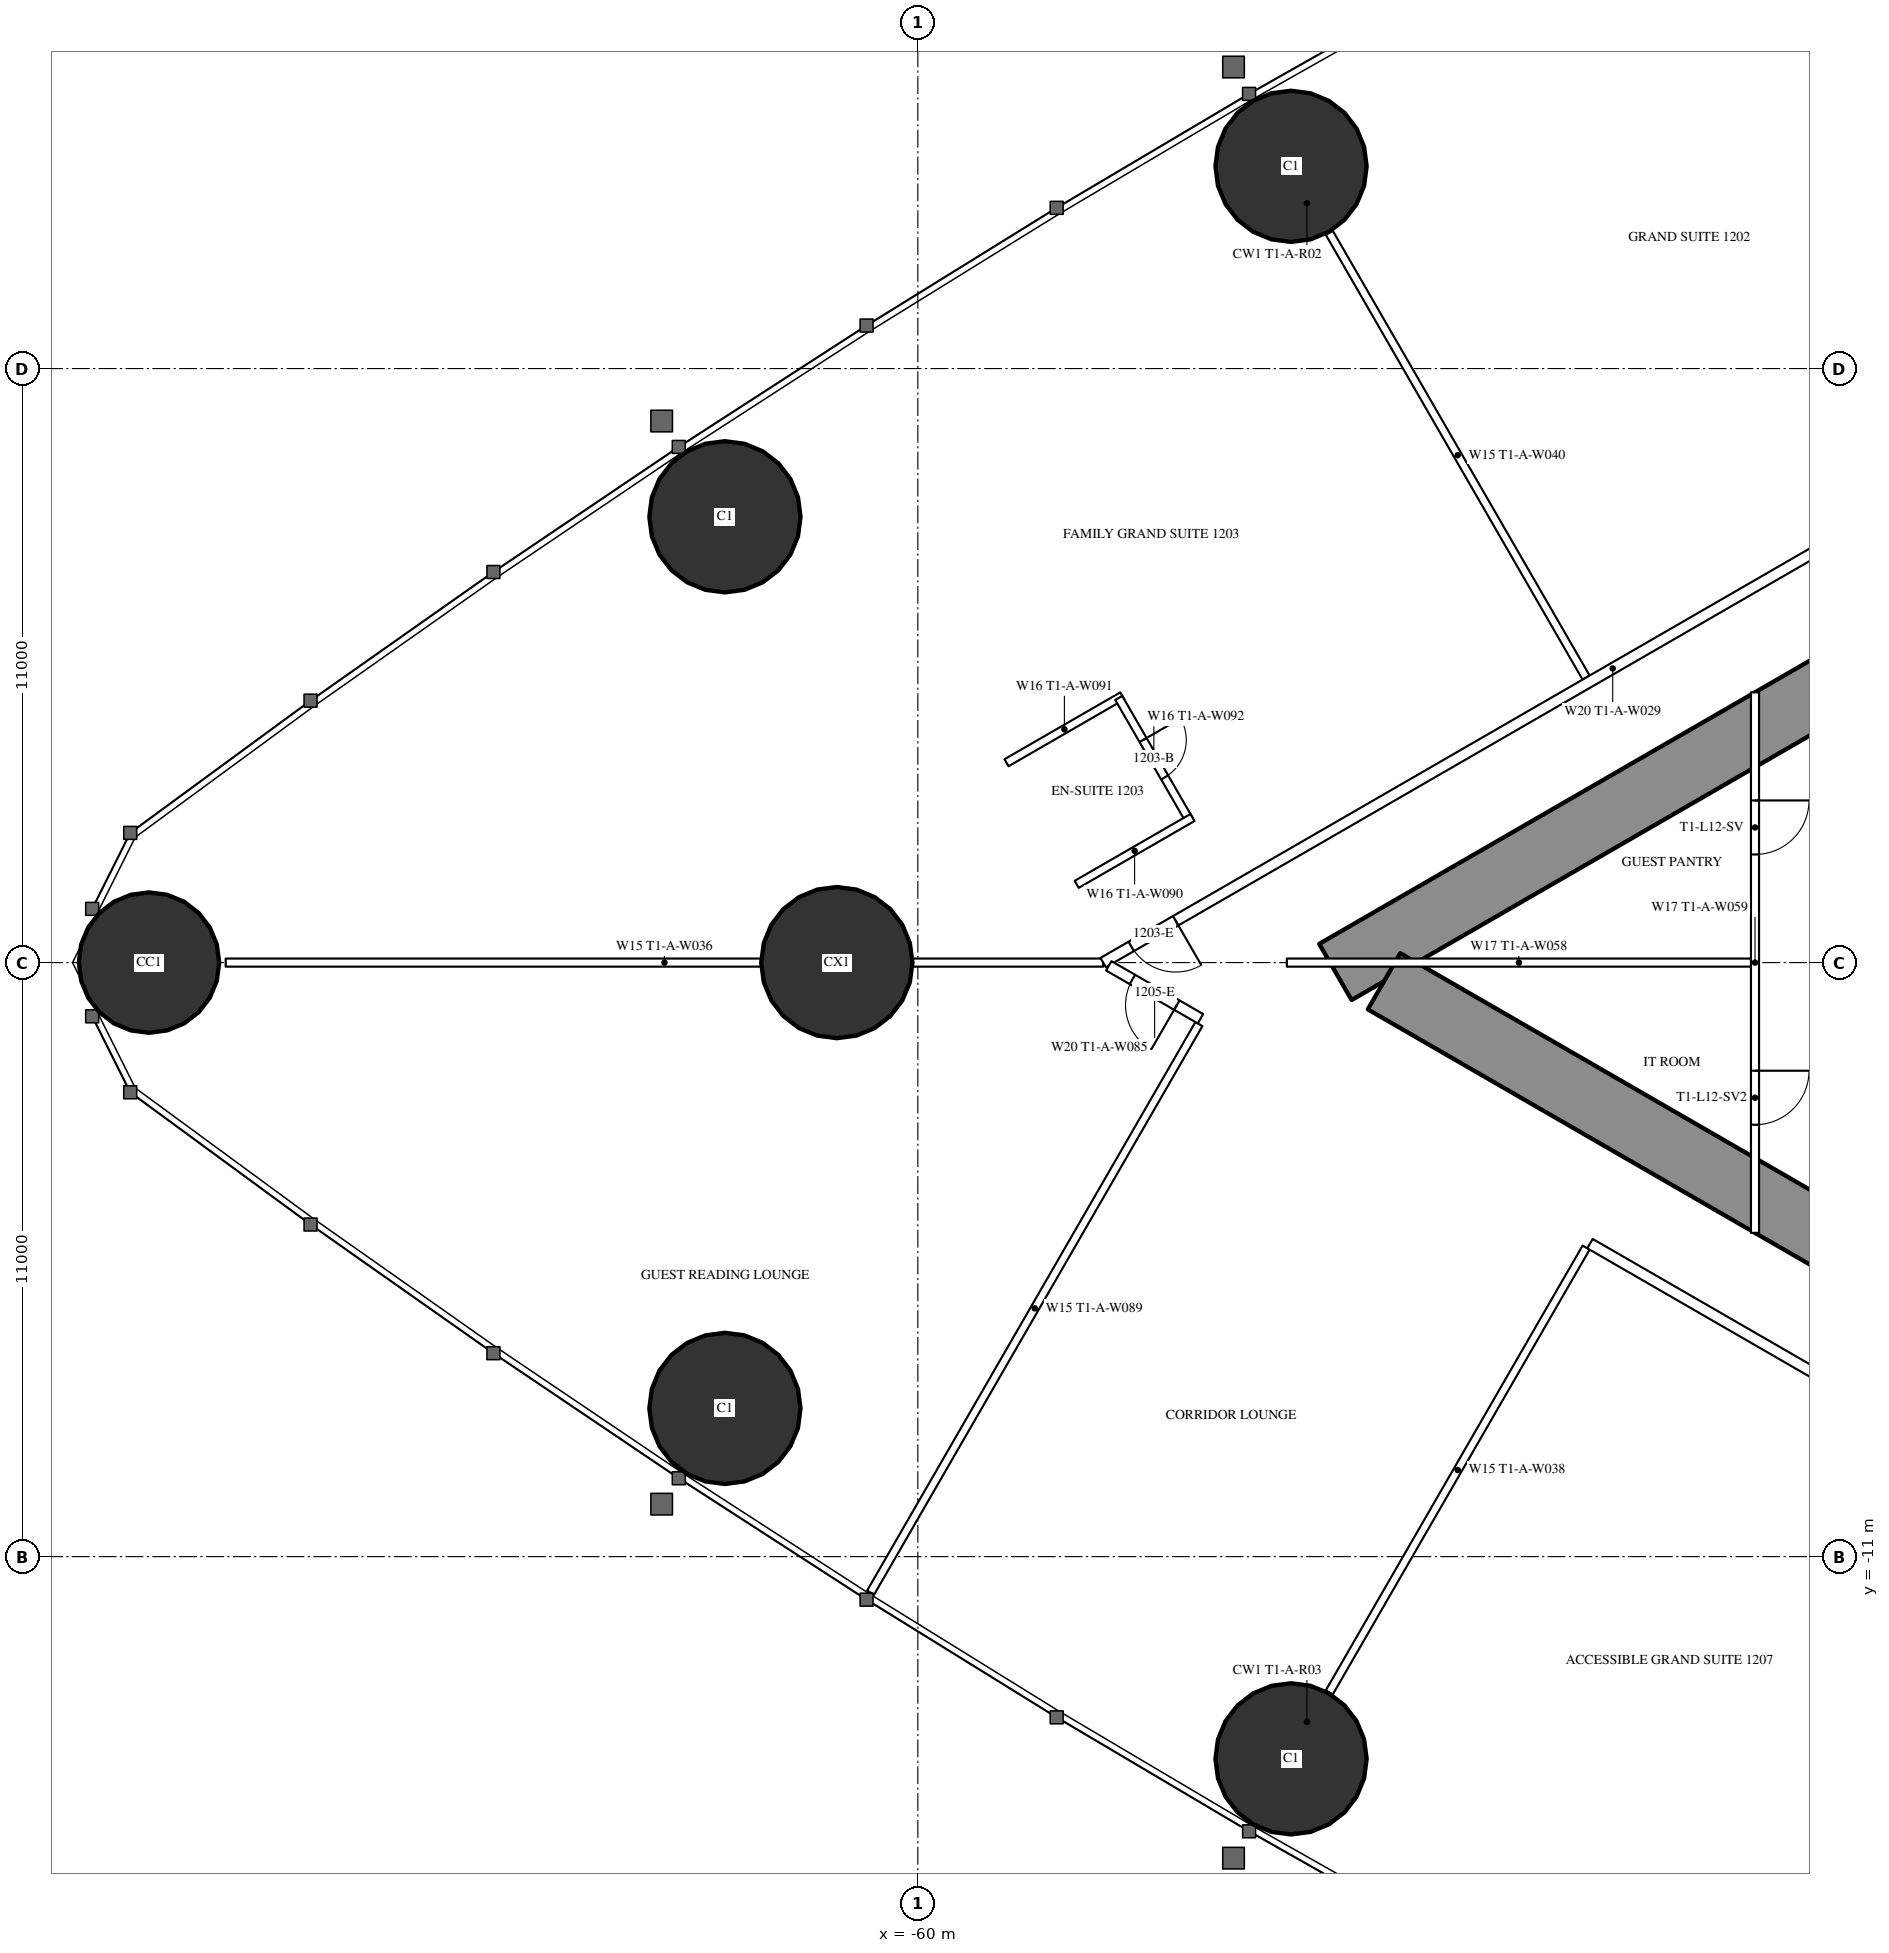
"""IFC4 building model, lengths in metres.
Left out: names, types, materials, properties, quantities, classifications, styles, units other than length and angle.
Written with IfcOpenShell. Run it as: python <this file> out.ifc"""

import sys

from ifc_helpers import new_model, si_unit, direction, frame, frame_2d, origin, origin_2d, place, context, subcontext, project, spatial, rectangle, hollow_circle, extrude, element, fill, save


model = new_model("IFC4")
c1 = context("Model", 3, precision=1e-05, world=origin(), true_north=direction((0.0, 1.0)))
c2 = subcontext(c1, "Body", "Model", "MODEL_VIEW")
j1 = project(units=[si_unit("LENGTHUNIT", "METRE"), si_unit("PLANEANGLEUNIT", "RADIAN")], contexts=[c1])
p1 = place(None, origin())
s1 = spatial("IfcSite", under=j1, at=p1, CompositionType="ELEMENT")
p2 = place(p1, origin())
s2 = spatial("IfcBuilding", under=s1, at=p2, CompositionType="ELEMENT")
p3 = place(p2, frame((0.0, 0.0, 49.5)))
s3 = spatial("IfcBuildingStorey", under=s2, at=p3, CompositionType="ELEMENT", Elevation=49.5)
p4 = place(p3, frame((-74.235, 0.0, 0.0), z_axis=(0.0, 0.0, 1.0), x_axis=(1.0, 0.0, 0.0)))
e1 = element("IfcColumn", 1, at=p4, inside=s3, PredefinedType="COLUMN", context=c2, shape_type="SweptSolid", body=[
    extrude(hollow_circle(Radius=1.3, WallThickness=0.1, at=origin_2d()), origin(), (0.0, 0.0, 1.0), 3.5),
])
for number, where, z_axis, x_axis in (
    (2, (-63.572, -8.255, 0.0), (0.0, 0.0, 1.0), (1.0, 0.0, 0.0)),
    (3, (-53.09, -14.745, 0.0), (0.0, 0.0, 1.0), (1.0, 0.0, 0.0)),
    (4, (-53.09, 14.745, 0.0), (0.0, 0.0, 1.0), (1.0, 0.0, 0.0)),
    (5, (-63.572, 8.255, 0.0), (0.0, 0.0, 1.0), (1.0, 0.0, 0.0)),
):
    element("IfcColumn", number, at=place(p3, frame(where, z_axis=z_axis, x_axis=x_axis)), inside=s3, PredefinedType="COLUMN", context=c2, shape_type="SweptSolid", body=[
        extrude(hollow_circle(Radius=1.4, WallThickness=0.12, at=origin_2d()), origin(), (0.0, 0.0, 1.0), 3.5),
    ])
p5 = place(p3, frame((-61.5, 0.0, 0.0), z_axis=(0.0, 0.0, 1.0), x_axis=(1.0, 0.0, 0.0)))
e6 = element("IfcColumn", 6, at=p5, inside=s3, PredefinedType="COLUMN", context=c2, shape_type="SweptSolid", body=[
    extrude(hollow_circle(Radius=1.4, WallThickness=0.1, at=origin_2d()), origin(), (0.0, 0.0, 1.0), 3.5),
])
p6 = place(p3, frame((-27.2, 14.3, 0.0), z_axis=(0.0, 0.0, 1.0), x_axis=(-0.866026593062, -0.499997940104, 0.0)))
e7 = element("IfcWall", 7, at=p6, inside=s3, PredefinedType="SHEAR", context=c2, shape_type="SweptSolid", body=[
    extrude(rectangle(XDim=28.946, YDim=1.2, at=frame_2d((14.473, 0.0))), origin(), (0.0, 0.0, 1.0), 3.5),
])
p7 = place(p6, frame((4.6, 0.0, 0.0)))
e8 = element("IfcOpeningElement", 8, at=p7, cuts=e7, PredefinedType="OPENING", context=c2, shape_type="SweptSolid", body=[
    extrude(rectangle(XDim=1.0, YDim=2.2, at=frame_2d((0.5, 1.1))), frame((0.0, 0.61, 0.0), z_axis=(0.0, -1.0, 0.0), x_axis=(1.0, 0.0, 0.0)), (0.0, 0.0, 1.0), 1.22),
])
p8 = place(p6, frame((13.395, 0.0, 0.0)))
e9 = element("IfcOpeningElement", 9, at=p8, cuts=e7, PredefinedType="OPENING", context=c2, shape_type="SweptSolid", body=[
    extrude(rectangle(XDim=1.8, YDim=2.2, at=frame_2d((0.9, 1.1))), frame((0.0, 0.61, 0.0), z_axis=(0.0, -1.0, 0.0), x_axis=(1.0, 0.0, 0.0)), (0.0, 0.0, 1.0), 1.22),
])
p9 = place(p3, frame((-27.2, -14.3, 0.0), z_axis=(0.0, 0.0, 1.0), x_axis=(-0.866024021859, 0.500002393557, 0.0)))
e10 = element("IfcWall", 10, at=p9, inside=s3, PredefinedType="SHEAR", context=c2, shape_type="SweptSolid", body=[
    extrude(rectangle(XDim=27.907, YDim=1.2, at=frame_2d((13.954, 0.0))), origin(), (0.0, 0.0, 1.0), 3.5),
])
p10 = place(p9, frame((4.6, 0.0, 0.0)))
e11 = element("IfcOpeningElement", 11, at=p10, cuts=e10, PredefinedType="OPENING", context=c2, shape_type="SweptSolid", body=[
    extrude(rectangle(XDim=1.0, YDim=2.2, at=frame_2d((0.5, 1.1))), frame((0.0, 0.61, 0.0), z_axis=(0.0, -1.0, 0.0), x_axis=(1.0, 0.0, 0.0)), (0.0, 0.0, 1.0), 1.22),
])
p11 = place(p9, frame((13.395, 0.0, 0.0)))
e12 = element("IfcOpeningElement", 12, at=p11, cuts=e10, PredefinedType="OPENING", context=c2, shape_type="SweptSolid", body=[
    extrude(rectangle(XDim=1.8, YDim=2.2, at=frame_2d((0.9, 1.1))), frame((0.0, 0.61, 0.0), z_axis=(0.0, -1.0, 0.0), x_axis=(1.0, 0.0, 0.0)), (0.0, 0.0, 1.0), 1.22),
])
for number, where, z_axis, x_axis in (
    (13, (-47.627, 5.278, 0.0), (0.0, 0.0, 1.0), (-0.5, 0.866, 0.0)),
    (14, (-47.627, -5.278, 0.0), (0.0, 0.0, 1.0), (-0.5, -0.866, 0.0)),
):
    element("IfcWall", number, at=place(p3, frame(where, z_axis=z_axis, x_axis=x_axis)), inside=s3, PredefinedType="PARTITIONING", context=c2, shape_type="SweptSolid", body=[
        extrude(rectangle(XDim=9.51, YDim=0.15, at=frame_2d((4.755, 0.0))), origin(), (0.0, 0.0, 1.0), 2.25),
    ])
p12 = place(p3, frame((-54.796, -1.139, 0.0), z_axis=(0.0, 0.0, 1.0), x_axis=(-0.499998860433, -0.866026061713, 0.0)))
e15 = element("IfcWall", 15, at=p12, inside=s3, PredefinedType="PARTITIONING", context=c2, shape_type="SweptSolid", body=[
    extrude(rectangle(XDim=12.157, YDim=0.15, at=frame_2d((6.078, 0.0))), origin(), (0.0, 0.0, 1.0), 3.25),
])
p13 = place(p3, frame((-56.568, 0.0, 0.0), z_axis=(0.0, 0.0, 1.0), x_axis=(-1.0, 0.0, 0.0)))
e16 = element("IfcWall", 16, at=p13, inside=s3, PredefinedType="PARTITIONING", context=c2, shape_type="SweptSolid", body=[
    extrude(rectangle(XDim=16.247, YDim=0.15, at=frame_2d((8.124, 0.0))), origin(), (0.0, 0.0, 1.0), 2.25),
])
p14 = place(p3, frame((-37.7, 10.894, 0.0), z_axis=(0.0, 0.0, 1.0), x_axis=(-0.866027905338, -0.499995667157, 0.0)))
e17 = element("IfcWall", 17, at=p14, inside=s3, PredefinedType="PARTITIONING", context=c2, shape_type="SweptSolid", body=[
    extrude(rectangle(XDim=21.787, YDim=0.2, at=frame_2d((10.894, 0.0))), origin(), (0.0, 0.0, 1.0), 3.25),
])
p15 = place(p14, frame((20.237, 0.0, 0.0)))
e18 = element("IfcOpeningElement", 18, at=p15, cuts=e17, PredefinedType="OPENING", context=c2, shape_type="SweptSolid", body=[
    extrude(rectangle(XDim=0.95, YDim=2.2, at=frame_2d((0.475, 1.1))), frame((0.0, 0.11, 0.0), z_axis=(0.0, -1.0, 0.0), x_axis=(1.0, 0.0, 0.0)), (0.0, 0.0, 1.0), 0.22),
])
p16 = place(p14, frame((2.95, 0.0, 0.0)))
e19 = element("IfcOpeningElement", 19, at=p16, cuts=e17, PredefinedType="OPENING", context=c2, shape_type="SweptSolid", body=[
    extrude(rectangle(XDim=0.95, YDim=2.2, at=frame_2d((0.475, 1.1))), frame((0.0, 0.11, 0.0), z_axis=(0.0, -1.0, 0.0), x_axis=(1.0, 0.0, 0.0)), (0.0, 0.0, 1.0), 0.22),
])
p17 = place(p3, frame((-36.92, -11.344, 0.0), z_axis=(0.0, 0.0, 1.0), x_axis=(-0.866025017052, 0.500000669839, 0.0)))
e20 = element("IfcWall", 20, at=p17, inside=s3, PredefinedType="PARTITIONING", context=c2, shape_type="SweptSolid", body=[
    extrude(rectangle(XDim=12.28, YDim=0.2, at=frame_2d((6.14, 0.0))), origin(), (0.0, 0.0, 1.0), 3.25),
])
p18 = place(p17, frame((3.35, 0.0, 0.0)))
e21 = element("IfcOpeningElement", 21, at=p18, cuts=e20, PredefinedType="OPENING", context=c2, shape_type="SweptSolid", body=[
    extrude(rectangle(XDim=1.0, YDim=2.2, at=frame_2d((0.5, 1.1))), frame((0.0, 0.11, 0.0), z_axis=(0.0, -1.0, 0.0), x_axis=(1.0, 0.0, 0.0)), (0.0, 0.0, 1.0), 0.22),
])
p19 = place(p3, frame((-54.768, -1.04, 0.0), z_axis=(0.0, 0.0, 1.0), x_axis=(-0.866056934013, 0.499945384066, 0.0)))
e22 = element("IfcWall", 22, at=p19, inside=s3, PredefinedType="PARTITIONING", context=c2, shape_type="SweptSolid", body=[
    extrude(rectangle(XDim=1.959, YDim=0.2, at=frame_2d((0.979, 0.0))), origin(), (0.0, 0.0, 1.0), 3.25),
])
p20 = place(p19, frame((0.505, 0.0, 0.0)))
e23 = element("IfcOpeningElement", 23, at=p20, cuts=e22, PredefinedType="OPENING", context=c2, shape_type="SweptSolid", body=[
    extrude(rectangle(XDim=0.95, YDim=2.2, at=frame_2d((0.475, 1.1))), frame((0.0, 0.11, 0.0), z_axis=(0.0, -1.0, 0.0), x_axis=(1.0, 0.0, 0.0)), (0.0, 0.0, 1.0), 0.22),
])
p21 = place(p3, frame((-56.215, 4.938, 0.0), z_axis=(0.0, 0.0, 1.0), x_axis=(-0.866006523861, -0.500032699561, 0.0)))
e24 = element("IfcWall", 24, at=p21, inside=s3, PredefinedType="PARTITIONING", context=c2, shape_type="SweptSolid", body=[
    extrude(rectangle(XDim=2.475, YDim=0.15, at=frame_2d((1.237, 0.0))), origin(), (0.0, 0.0, 1.0), 3.25),
])
p22 = place(p3, frame((-54.98, 2.649, 0.0), z_axis=(0.0, 0.0, 1.0), x_axis=(-0.500006934395, 0.866021400173, 0.0)))
e25 = element("IfcWall", 25, at=p22, inside=s3, PredefinedType="PARTITIONING", context=c2, shape_type="SweptSolid", body=[
    extrude(rectangle(XDim=2.6, YDim=0.15, at=frame_2d((1.3, 0.0))), origin(), (0.0, 0.0, 1.0), 3.25),
])
p23 = place(p22, frame((0.9, 0.0, 0.0)))
e26 = element("IfcOpeningElement", 26, at=p23, cuts=e25, PredefinedType="OPENING", context=c2, shape_type="SweptSolid", body=[
    extrude(rectangle(XDim=0.8, YDim=2.2, at=frame_2d((0.4, 1.1))), frame((0.0, 0.085, 0.0), z_axis=(0.0, -1.0, 0.0), x_axis=(1.0, 0.0, 0.0)), (0.0, 0.0, 1.0), 0.17),
])
p24 = place(p3, frame((-54.915, 2.687, 0.0), z_axis=(0.0, 0.0, 1.0), x_axis=(-0.866006523861, -0.500032699561, 0.0)))
e27 = element("IfcWall", 27, at=p24, inside=s3, PredefinedType="PARTITIONING", context=c2, shape_type="SweptSolid", body=[
    extrude(rectangle(XDim=2.475, YDim=0.15, at=frame_2d((1.237, 0.0))), origin(), (0.0, 0.0, 1.0), 3.25),
])
p25 = place(p3, frame((-44.5, 5.005, 0.0), z_axis=(0.0, 0.0, 1.0), x_axis=(0.0, -1.0, 0.0)))
e28 = element("IfcWall", 28, at=p25, inside=s3, PredefinedType="PARTITIONING", context=c2, shape_type="SweptSolid", body=[
    extrude(rectangle(XDim=10.009, YDim=0.15, at=frame_2d((5.005, 0.0))), origin(), (0.0, 0.0, 1.0), 2.45),
])
p26 = place(p25, frame((2.002, 0.0, 0.0)))
e29 = element("IfcOpeningElement", 29, at=p26, cuts=e28, PredefinedType="OPENING", context=c2, shape_type="SweptSolid", body=[
    extrude(rectangle(XDim=1.0, YDim=2.2, at=frame_2d((0.5, 1.1))), frame((0.0, 0.085, 0.0), z_axis=(0.0, -1.0, 0.0), x_axis=(1.0, 0.0, 0.0)), (0.0, 0.0, 1.0), 0.17),
])
p27 = place(p25, frame((7.007, 0.0, 0.0)))
e30 = element("IfcOpeningElement", 30, at=p27, cuts=e28, PredefinedType="OPENING", context=c2, shape_type="SweptSolid", body=[
    extrude(rectangle(XDim=1.0, YDim=2.2, at=frame_2d((0.5, 1.1))), frame((0.0, 0.085, 0.0), z_axis=(0.0, -1.0, 0.0), x_axis=(1.0, 0.0, 0.0)), (0.0, 0.0, 1.0), 0.17),
])
p28 = place(p3, frame((-44.575, 0.0, 0.0), z_axis=(0.0, 0.0, 1.0), x_axis=(-1.0, 0.0, 0.0)))
e31 = element("IfcWall", 31, at=p28, inside=s3, PredefinedType="PARTITIONING", context=c2, shape_type="SweptSolid", body=[
    extrude(rectangle(XDim=8.593, YDim=0.15, at=frame_2d((4.297, 0.0))), origin(), (0.0, 0.0, 1.0), 2.25),
])
p29 = place(p23, origin())
e32 = element("IfcDoor", 32, at=p29, inside=s3, OperationType="SINGLE_SWING_RIGHT", PredefinedType="DOOR", context=c2, shape_type="SweptSolid", body=[
    extrude(rectangle(XDim=0.8, YDim=2.2, at=frame_2d((0.4, 1.1))), frame((0.0, 0.025, 0.0), z_axis=(0.0, -1.0, 0.0), x_axis=(1.0, 0.0, 0.0)), (0.0, 0.0, 1.0), 0.05),
])
fill(e26, e32)
p30 = place(p15, origin())
e33 = element("IfcDoor", 33, at=p30, inside=s3, OperationType="SINGLE_SWING_LEFT", PredefinedType="DOOR", context=c2, shape_type="SweptSolid", body=[
    extrude(rectangle(XDim=0.95, YDim=2.2, at=frame_2d((0.475, 1.1))), frame((0.0, 0.025, 0.0), z_axis=(0.0, -1.0, 0.0), x_axis=(1.0, 0.0, 0.0)), (0.0, 0.0, 1.0), 0.05),
])
fill(e18, e33)
p31 = place(p20, origin())
e34 = element("IfcDoor", 34, at=p31, inside=s3, OperationType="SINGLE_SWING_LEFT", PredefinedType="DOOR", context=c2, shape_type="SweptSolid", body=[
    extrude(rectangle(XDim=0.95, YDim=2.2, at=frame_2d((0.475, 1.1))), frame((0.0, 0.025, 0.0), z_axis=(0.0, -1.0, 0.0), x_axis=(1.0, 0.0, 0.0)), (0.0, 0.0, 1.0), 0.05),
])
fill(e23, e34)
p32 = place(p26, origin())
e35 = element("IfcDoor", 35, at=p32, inside=s3, OperationType="SINGLE_SWING_LEFT", PredefinedType="DOOR", context=c2, shape_type="SweptSolid", body=[
    extrude(rectangle(XDim=1.0, YDim=2.2, at=frame_2d((0.5, 1.1))), frame((0.0, 0.025, 0.0), z_axis=(0.0, -1.0, 0.0), x_axis=(1.0, 0.0, 0.0)), (0.0, 0.0, 1.0), 0.05),
])
fill(e29, e35)
p33 = place(p27, origin())
e36 = element("IfcDoor", 36, at=p33, inside=s3, OperationType="SINGLE_SWING_LEFT", PredefinedType="DOOR", context=c2, shape_type="SweptSolid", body=[
    extrude(rectangle(XDim=1.0, YDim=2.2, at=frame_2d((0.5, 1.1))), frame((0.0, 0.025, 0.0), z_axis=(0.0, -1.0, 0.0), x_axis=(1.0, 0.0, 0.0)), (0.0, 0.0, 1.0), 0.05),
])
fill(e30, e36)
save(model, sys.argv[1])
